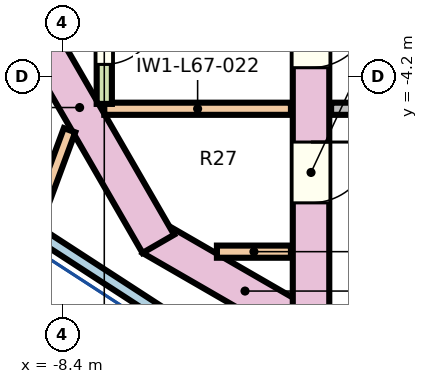
"""IFC4 building model, lengths in metres.
Left out: names, types, materials, properties, quantities, classifications, styles, units other than length and angle.
Written with IfcOpenShell. Run it as: python <this file> out.ifc"""

import sys

from ifc_helpers import new_model, si_unit, direction, frame, frame_2d, origin, place, context, subcontext, project, spatial, rectangle, extrude, element, fill, save


model = new_model("IFC4")
c1 = context("Model", 3, precision=1e-05, world=origin(), true_north=direction((0.0, 1.0)))
c2 = subcontext(c1, "Body", "Model", "MODEL_VIEW")
j1 = project(units=[si_unit("LENGTHUNIT", "METRE"), si_unit("PLANEANGLEUNIT", "RADIAN")], contexts=[c1])
p1 = place(None, origin())
s1 = spatial("IfcSite", under=j1, at=p1, CompositionType="ELEMENT")
p2 = place(p1, origin())
s2 = spatial("IfcBuilding", under=s1, at=p2, CompositionType="ELEMENT")
p3 = place(p2, frame((0.0, 0.0, 306.1)))
s3 = spatial("IfcBuildingStorey", under=s2, at=p3, CompositionType="ELEMENT", Elevation=306.1)
p4 = place(p3, frame((-3.85, -8.584, 0.0), z_axis=(0.0, 0.0, 1.0), x_axis=(-0.866039982607, 0.499974747889, 0.0)))
e1 = element("IfcWall", 1, at=p4, inside=s3, PredefinedType="SHEAR", context=c2, shape_type="SweptSolid", body=[
    extrude(rectangle(XDim=3.546, YDim=0.6, at=frame_2d((1.773, 0.0))), origin(), (0.0, 0.0, 1.0), 3.6),
])
p5 = place(p3, frame((-6.811, -6.921, 0.0), z_axis=(0.0, 0.0, 1.0), x_axis=(-0.499989188378, 0.866031645787, 0.0)))
e2 = element("IfcWall", 2, at=p5, inside=s3, PredefinedType="SHEAR", context=c2, shape_type="SweptSolid", body=[
    extrude(rectangle(XDim=5.176, YDim=0.6, at=frame_2d((2.588, 0.0))), origin(), (0.0, 0.0, 1.0), 3.6),
])
p6 = place(p3, frame((-4.3, 8.844, 0.0), z_axis=(0.0, 0.0, 1.0), x_axis=(0.0, -1.0, 0.0)))
e3 = element("IfcWall", 3, at=p6, inside=s3, PredefinedType="SHEAR", context=c2, shape_type="SweptSolid", body=[
    extrude(rectangle(XDim=17.688, YDim=0.6, at=frame_2d((8.844, 0.0))), origin(), (0.0, 0.0, 1.0), 3.6),
])
p7 = place(p6, frame((9.469, 0.0, 0.0)))
e4 = element("IfcOpeningElement", 4, at=p7, cuts=e3, PredefinedType="OPENING", context=c2, shape_type="SweptSolid", body=[
    extrude(rectangle(XDim=1.1, YDim=2.1, at=frame_2d((0.55, 1.05))), frame((0.0, 0.31, 0.0), z_axis=(0.0, -1.0, 0.0), x_axis=(1.0, 0.0, 0.0)), (0.0, 0.0, 1.0), 0.62),
])
p8 = place(p6, frame((7.119, 0.0, 0.0)))
e5 = element("IfcOpeningElement", 5, at=p8, cuts=e3, PredefinedType="OPENING", context=c2, shape_type="SweptSolid", body=[
    extrude(rectangle(XDim=1.1, YDim=2.1, at=frame_2d((0.55, 1.05))), frame((0.0, 0.31, 0.0), z_axis=(0.0, -1.0, 0.0), x_axis=(1.0, 0.0, 0.0)), (0.0, 0.0, 1.0), 0.62),
])
p9 = place(p6, frame((4.769, 0.0, 0.0)))
e6 = element("IfcOpeningElement", 6, at=p9, cuts=e3, PredefinedType="OPENING", context=c2, shape_type="SweptSolid", body=[
    extrude(rectangle(XDim=1.1, YDim=2.1, at=frame_2d((0.55, 1.05))), frame((0.0, 0.31, 0.0), z_axis=(0.0, -1.0, 0.0), x_axis=(1.0, 0.0, 0.0)), (0.0, 0.0, 1.0), 0.62),
])
p10 = place(p6, frame((14.092, 0.0, 0.0)))
e7 = element("IfcOpeningElement", 7, at=p10, cuts=e3, PredefinedType="OPENING", context=c2, shape_type="SweptSolid", body=[
    extrude(rectangle(XDim=1.0, YDim=2.1, at=frame_2d((0.5, 1.05))), frame((0.0, 0.31, 0.0), z_axis=(0.0, -1.0, 0.0), x_axis=(1.0, 0.0, 0.0)), (0.0, 0.0, 1.0), 0.62),
])
p11 = place(p6, frame((2.572, 0.0, 0.0)))
e8 = element("IfcOpeningElement", 8, at=p11, cuts=e3, PredefinedType="OPENING", context=c2, shape_type="SweptSolid", body=[
    extrude(rectangle(XDim=1.0, YDim=2.1, at=frame_2d((0.5, 1.05))), frame((0.0, 0.31, 0.0), z_axis=(0.0, -1.0, 0.0), x_axis=(1.0, 0.0, 0.0)), (0.0, 0.0, 1.0), 0.62),
])
p12 = place(p6, frame((11.869, 0.0, 0.0)))
e9 = element("IfcOpeningElement", 9, at=p12, cuts=e3, PredefinedType="OPENING", context=c2, shape_type="SweptSolid", body=[
    extrude(rectangle(XDim=1.0, YDim=2.1, at=frame_2d((0.5, 1.05))), frame((0.0, 0.31, 0.0), z_axis=(0.0, -1.0, 0.0), x_axis=(1.0, 0.0, 0.0)), (0.0, 0.0, 1.0), 0.62),
])
p13 = place(p3, frame((-8.655, -6.837, 0.0), z_axis=(0.0, 0.0, 1.0), x_axis=(-0.544647854685, -0.838664840319, 0.0)))
e10 = element("IfcWall", 10, at=p13, inside=s3, PredefinedType="SOLIDWALL", context=c2, shape_type="SweptSolid", body=[
    extrude(rectangle(XDim=3.05, YDim=0.2, at=frame_2d((1.525, 0.0))), origin(), (0.0, 0.0, 1.0), 3.35),
])
p14 = place(p3, frame((-8.655, -6.837, 0.0), z_axis=(0.0, 0.0, 1.0), x_axis=(0.838674843592, -0.544632451041, 0.0)))
e11 = element("IfcWall", 11, at=p14, inside=s3, PredefinedType="SOLIDWALL", context=c2, shape_type="SweptSolid", body=[
    extrude(rectangle(XDim=5.45, YDim=0.2, at=frame_2d((2.725, 0.0))), origin(), (0.0, 0.0, 1.0), 3.35),
])
p15 = place(p3, frame((-8.271, -5.052, 0.0), z_axis=(0.0, 0.0, 1.0), x_axis=(-0.347473745141, -0.937689712239, 0.0)))
e12 = element("IfcWall", 12, at=p15, inside=s3, PredefinedType="PARTITIONING", context=c2, shape_type="SweptSolid", body=[
    extrude(rectangle(XDim=2.245, YDim=0.2, at=frame_2d((1.123, 0.0))), origin(), (0.0, 0.0, 1.0), 3.35),
])
p16 = place(p3, frame((-7.7, -4.7, 0.0), z_axis=(0.0, 0.0, 1.0), x_axis=(1.0, 0.0, 0.0)))
e13 = element("IfcWall", 13, at=p16, inside=s3, PredefinedType="PARTITIONING", context=c2, shape_type="SweptSolid", body=[
    extrude(rectangle(XDim=3.07, YDim=0.2, at=frame_2d((1.535, 0.0))), origin(), (0.0, 0.0, 1.0), 3.35),
])
p17 = place(p3, frame((-7.7, 4.7, 0.0), z_axis=(0.0, 0.0, 1.0), x_axis=(0.0, -1.0, 0.0)))
e14 = element("IfcWall", 14, at=p17, inside=s3, PredefinedType="SOLIDWALL", context=c2, shape_type="SweptSolid", body=[
    extrude(rectangle(XDim=9.32, YDim=0.25, at=frame_2d((4.66, 0.0))), origin(), (0.0, 0.0, 1.0), 3.35),
])
p18 = place(p17, frame((7.771, 0.0, 0.0)))
e15 = element("IfcOpeningElement", 15, at=p18, cuts=e14, PredefinedType="OPENING", context=c2, shape_type="SweptSolid", body=[
    extrude(rectangle(XDim=0.9, YDim=2.1, at=frame_2d((0.45, 1.05))), frame((0.0, 0.135, 0.0), z_axis=(0.0, -1.0, 0.0), x_axis=(1.0, 0.0, 0.0)), (0.0, 0.0, 1.0), 0.27),
])
p19 = place(p3, frame((-5.491, 17.125, 0.0), z_axis=(0.0, 0.0, 1.0), x_axis=(-0.347478457093, -0.937687966147, 0.0)))
e16 = element("IfcWall", 16, at=p19, inside=s3, PredefinedType="PARTITIONING", context=c2, shape_type="SweptSolid", body=[
    extrude(rectangle(XDim=28.2, YDim=0.2, at=frame_2d((14.1, 0.0))), origin(), (0.0, 0.0, 1.0), 3.35),
])
p20 = place(p19, frame((9.725, 0.0, 0.0)))
e17 = element("IfcOpeningElement", 17, at=p20, cuts=e16, PredefinedType="OPENING", context=c2, shape_type="SweptSolid", body=[
    extrude(rectangle(XDim=0.9, YDim=2.1, at=frame_2d((0.45, 1.05))), frame((0.0, 0.11, 0.0), z_axis=(0.0, -1.0, 0.0), x_axis=(1.0, 0.0, 0.0)), (0.0, 0.0, 1.0), 0.22),
])
p21 = place(p3, frame((-4.63, -7.05, 0.0), z_axis=(0.0, 0.0, 1.0), x_axis=(-1.0, 0.0, 0.0)))
e18 = element("IfcWall", 18, at=p21, inside=s3, PredefinedType="PARTITIONING", context=c2, shape_type="SweptSolid", body=[
    extrude(rectangle(XDim=1.218, YDim=0.2, at=frame_2d((0.609, 0.0))), origin(), (0.0, 0.0, 1.0), 3.35),
])
p22 = place(p3, frame((0.8, -4.7, 0.0), z_axis=(0.0, 0.0, 1.0), x_axis=(-1.0, 0.0, 0.0)))
e19 = element("IfcWall", 19, at=p22, inside=s3, PredefinedType="PARTITIONING", context=c2, shape_type="SweptSolid", body=[
    extrude(rectangle(XDim=4.77, YDim=0.2, at=frame_2d((2.385, 0.0))), origin(), (0.0, 0.0, 1.0), 3.35),
])
p23 = place(p22, frame((1.4, 0.0, 0.0)))
e20 = element("IfcOpeningElement", 20, at=p23, cuts=e19, PredefinedType="OPENING", context=c2, shape_type="SweptSolid", body=[
    extrude(rectangle(XDim=2.0, YDim=2.1, at=frame_2d((1.0, 1.05))), frame((0.0, 0.11, 0.0), z_axis=(0.0, -1.0, 0.0), x_axis=(1.0, 0.0, 0.0)), (0.0, 0.0, 1.0), 0.22),
])
p24 = place(p18, origin())
e21 = element("IfcDoor", 21, at=p24, inside=s3, OperationType="NOTDEFINED", PredefinedType="DOOR", context=c2, shape_type="SweptSolid", body=[
    extrude(rectangle(XDim=0.9, YDim=2.1, at=frame_2d((0.45, 1.05))), frame((0.0, 0.025, 0.0), z_axis=(0.0, -1.0, 0.0), x_axis=(1.0, 0.0, 0.0)), (0.0, 0.0, 1.0), 0.05),
])
fill(e15, e21)
p25 = place(p10, origin())
e22 = element("IfcDoor", 22, at=p25, inside=s3, OperationType="NOTDEFINED", PredefinedType="DOOR", context=c2, shape_type="SweptSolid", body=[
    extrude(rectangle(XDim=1.0, YDim=2.1, at=frame_2d((0.5, 1.05))), frame((0.0, 0.025, 0.0), z_axis=(0.0, -1.0, 0.0), x_axis=(1.0, 0.0, 0.0)), (0.0, 0.0, 1.0), 0.05),
])
fill(e7, e22)
p26 = place(p12, origin())
e23 = element("IfcDoor", 23, at=p26, inside=s3, OperationType="NOTDEFINED", PredefinedType="DOOR", context=c2, shape_type="SweptSolid", body=[
    extrude(rectangle(XDim=1.0, YDim=2.1, at=frame_2d((0.5, 1.05))), frame((0.0, 0.025, 0.0), z_axis=(0.0, -1.0, 0.0), x_axis=(1.0, 0.0, 0.0)), (0.0, 0.0, 1.0), 0.05),
])
fill(e9, e23)
save(model, sys.argv[1])
